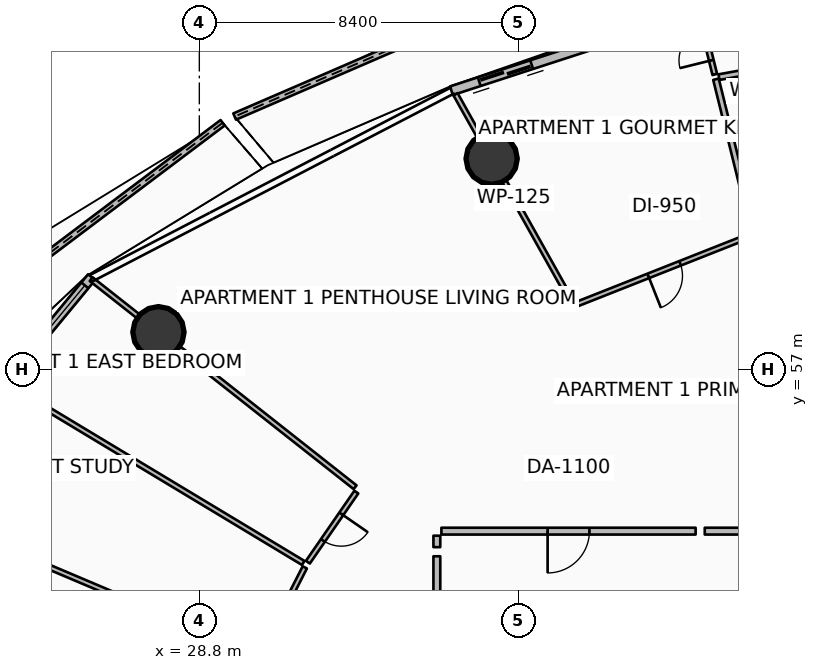
"""IFC4 building model, lengths in metres.
Left out: names, types, materials, properties, quantities, classifications, styles, units other than length and angle.
Written with IfcOpenShell. Run it as: python <this file> out.ifc"""

import sys

from ifc_helpers import new_model, si_unit, direction, frame, frame_2d, origin, origin_2d, place, context, subcontext, project, spatial, polyline, rectangle, circle, outline, extrude, element, fill, save


model = new_model("IFC4")
c1 = context("Model", 3, precision=1e-05, world=origin(), true_north=direction((0.0, 1.0)))
c2 = subcontext(c1, "Body", "Model", "MODEL_VIEW")
j1 = project(units=[si_unit("LENGTHUNIT", "METRE"), si_unit("PLANEANGLEUNIT", "RADIAN")], contexts=[c1])
p1 = place(None, origin())
s1 = spatial("IfcSite", under=j1, at=p1, CompositionType="ELEMENT")
p2 = place(p1, origin())
s2 = spatial("IfcBuilding", under=s1, at=p2, CompositionType="ELEMENT")
p3 = place(p2, frame((0.0, 0.0, 67.65)))
s3 = spatial("IfcBuildingStorey", under=s2, at=p3, CompositionType="ELEMENT", Elevation=67.65)
for number, where, z_axis, x_axis in (
    (1, (36.492, 62.55, 0.0), (0.0, 0.0, 1.0), (1.0, 0.0, 0.0)),
    (2, (27.724, 57.984, 0.0), (0.0, 0.0, 1.0), (1.0, 0.0, 0.0)),
):
    element("IfcColumn", number, at=place(p3, frame(where, z_axis=z_axis, x_axis=x_axis)), inside=s3, PredefinedType="COLUMN", context=c2, shape_type="SweptSolid", body=[
        extrude(circle(Radius=0.675, at=origin_2d()), origin(), (0.0, 0.0, 1.0), 3.35),
    ])
p4 = place(p3, frame((39.469, 67.87, 0.0), z_axis=(0.0, 0.0, 1.0), x_axis=(-0.91788240727, -0.396852474384, 0.0)))
e3 = element("IfcWall", 3, at=p4, inside=s3, PredefinedType="PARAPET", context=c2, shape_type="SweptSolid", body=[
    extrude(outline(polyline([(0.0, 0.0), (10.611, 0.0), (10.611, 1.12), (5.305, 1.182), (0.0, 1.348), (0.0, 0.0)])), frame((0.0, 0.09, 0.0), z_axis=(0.0, -1.0, 0.0), x_axis=(1.0, 0.0, 0.0)), (0.0, 0.0, 1.0), 0.18),
])
p5 = place(p3, frame((29.413, 63.495, 0.0), z_axis=(0.0, 0.0, 1.0), x_axis=(-0.798916487869, -0.601441971773, 0.0)))
e4 = element("IfcWall", 4, at=p5, inside=s3, PredefinedType="PARAPET", context=c2, shape_type="SweptSolid", body=[
    extrude(outline(polyline([(0.0, 0.0), (11.803, 0.0), (11.803, 1.348), (5.902, 1.182), (0.0, 1.12), (0.0, 0.0)])), frame((0.0, 0.09, 0.0), z_axis=(0.0, -1.0, 0.0), x_axis=(1.0, 0.0, 0.0)), (0.0, 0.0, 1.0), 0.18),
])
p6 = place(p3, frame((45.036, 67.458, 0.0), z_axis=(0.0, 0.0, 1.0), x_axis=(-0.951054679225, -0.309022648238, 0.0)))
e5 = element("IfcWall", 5, at=p6, inside=s3, PredefinedType="SOLIDWALL", context=c2, shape_type="SweptSolid", body=[
    extrude(rectangle(XDim=10.097, YDim=0.24, at=frame_2d((5.048, 0.0))), origin(), (0.0, 0.0, 1.0), 2.3),
])
p7 = place(p6, frame((7.877, 0.0, 0.0)))
e6 = element("IfcOpeningElement", 6, at=p7, cuts=e5, PredefinedType="OPENING", context=c2, shape_type="SweptSolid", body=[
    extrude(rectangle(XDim=1.45, YDim=2.15, at=frame_2d((0.725, 1.075))), frame((0.0, 0.13, 0.0), z_axis=(0.0, -1.0, 0.0), x_axis=(1.0, 0.0, 0.0)), (0.0, 0.0, 1.0), 0.26),
])
p8 = place(p6, frame((0.28, 0.0, 0.65)))
e7 = element("IfcOpeningElement", 7, at=p8, cuts=e5, PredefinedType="OPENING", context=c2, shape_type="SweptSolid", body=[
    extrude(rectangle(XDim=1.6, YDim=1.5, at=frame_2d((0.8, 0.75))), frame((0.0, 0.13, 0.0), z_axis=(0.0, -1.0, 0.0), x_axis=(1.0, 0.0, 0.0)), (0.0, 0.0, 1.0), 0.26),
])
p9 = place(p3, frame((25.967, 59.433, 0.0), z_axis=(0.0, 0.0, 1.0), x_axis=(-0.636674332663, -0.771132799281, 0.0)))
e8 = element("IfcWall", 8, at=p9, inside=s3, PredefinedType="SOLIDWALL", context=c2, shape_type="SweptSolid", body=[
    extrude(rectangle(XDim=11.851, YDim=0.24, at=frame_2d((5.926, 0.0))), origin(), (0.0, 0.0, 1.0), 2.3),
])
p10 = place(p9, frame((9.631, 0.0, 0.0)))
e9 = element("IfcOpeningElement", 9, at=p10, cuts=e8, PredefinedType="OPENING", context=c2, shape_type="SweptSolid", body=[
    extrude(rectangle(XDim=1.45, YDim=2.15, at=frame_2d((0.725, 1.075))), frame((0.0, 0.13, 0.0), z_axis=(0.0, -1.0, 0.0), x_axis=(1.0, 0.0, 0.0)), (0.0, 0.0, 1.0), 0.26),
])
p11 = place(p9, frame((0.28, 0.0, 0.65)))
e10 = element("IfcOpeningElement", 10, at=p11, cuts=e8, PredefinedType="OPENING", context=c2, shape_type="SweptSolid", body=[
    extrude(rectangle(XDim=1.6, YDim=1.5, at=frame_2d((0.8, 0.75))), frame((0.0, 0.13, 0.0), z_axis=(0.0, -1.0, 0.0), x_axis=(1.0, 0.0, 0.0)), (0.0, 0.0, 1.0), 0.26),
])
p12 = place(p3, frame((41.86, 52.75, 0.0), z_axis=(0.0, 0.0, 1.0), x_axis=(-1.0, 0.0, 0.0)))
e11 = element("IfcWall", 11, at=p12, inside=s3, PredefinedType="PARTITIONING", context=c2, shape_type="SweptSolid", body=[
    extrude(rectangle(XDim=6.69, YDim=0.18, at=frame_2d((3.345, 0.0))), origin(), (0.0, 0.0, 1.0), 2.717),
])
p13 = place(p12, frame((2.795, 0.0, 0.0)))
e12 = element("IfcOpeningElement", 12, at=p13, cuts=e11, PredefinedType="OPENING", context=c2, shape_type="SweptSolid", body=[
    extrude(rectangle(XDim=1.1, YDim=2.1, at=frame_2d((0.55, 1.05))), frame((0.0, 0.1, 0.0), z_axis=(0.0, -1.0, 0.0), x_axis=(1.0, 0.0, 0.0)), (0.0, 0.0, 1.0), 0.2),
])
p14 = place(p3, frame((35.05, 52.63, 0.0), z_axis=(0.0, 0.0, 1.0), x_axis=(0.0, -1.0, 0.0)))
e13 = element("IfcWall", 13, at=p14, inside=s3, PredefinedType="PARTITIONING", context=c2, shape_type="SweptSolid", body=[
    extrude(rectangle(XDim=0.301, YDim=0.18, at=frame_2d((0.15, 0.0))), origin(), (0.0, 0.0, 1.0), 2.717),
])
p15 = place(p3, frame((46.608, 52.75, 0.0), z_axis=(0.0, 0.0, 1.0), x_axis=(-1.0, 0.0, 0.0)))
e14 = element("IfcWall", 14, at=p15, inside=s3, PredefinedType="PARTITIONING", context=c2, shape_type="SweptSolid", body=[
    extrude(rectangle(XDim=4.508, YDim=0.18, at=frame_2d((2.254, 0.0))), origin(), (0.0, 0.0, 1.0), 2.717),
])
p16 = place(p3, frame((38.604, 58.778, 0.0), z_axis=(0.0, 0.0, 1.0), x_axis=(-0.488617606889, 0.872498042541, 0.0)))
e15 = element("IfcWall", 15, at=p16, inside=s3, PredefinedType="PARTITIONING", context=c2, shape_type="SweptSolid", body=[
    extrude(rectangle(XDim=6.266, YDim=0.125, at=frame_2d((3.133, 0.0))), origin(), (0.0, 0.0, 1.0), 2.717),
])
p17 = place(p3, frame((45.156, 65.184, 0.0), z_axis=(0.0, 0.0, 1.0), x_axis=(-0.983792433056, -0.179311038873, 0.0)))
e16 = element("IfcWall", 16, at=p17, inside=s3, PredefinedType="PARTITIONING", context=c2, shape_type="SweptSolid", body=[
    extrude(rectangle(XDim=2.726, YDim=0.15, at=frame_2d((1.363, 0.0))), origin(), (0.0, 0.0, 1.0), 2.717),
])
p18 = place(p3, frame((43.381, 60.657, 0.0), z_axis=(0.0, 0.0, 1.0), x_axis=(-0.240281337946, 0.97070329073, 0.0)))
e17 = element("IfcWall", 17, at=p18, inside=s3, PredefinedType="PARTITIONING", context=c2, shape_type="SweptSolid", body=[
    extrude(rectangle(XDim=4.104, YDim=0.15, at=frame_2d((2.052, 0.0))), origin(), (0.0, 0.0, 1.0), 2.79),
])
p19 = place(p3, frame((42.364, 64.767, 0.0), z_axis=(0.0, 0.0, 1.0), x_axis=(-0.240399183991, 0.970674112324, 0.0)))
e18 = element("IfcWall", 18, at=p19, inside=s3, PredefinedType="PARTITIONING", context=c2, shape_type="SweptSolid", body=[
    extrude(rectangle(XDim=1.614, YDim=0.125, at=frame_2d((0.807, 0.0))), origin(), (0.0, 0.0, 1.0), 2.79),
])
p20 = place(p19, frame((0.382, 0.0, 0.0)))
e19 = element("IfcOpeningElement", 19, at=p20, cuts=e18, PredefinedType="OPENING", context=c2, shape_type="SweptSolid", body=[
    extrude(rectangle(XDim=0.85, YDim=2.06, at=frame_2d((0.425, 1.03))), frame((0.0, 0.073, 0.0), z_axis=(0.0, -1.0, 0.0), x_axis=(1.0, 0.0, 0.0)), (0.0, 0.0, 1.0), 0.145),
])
p21 = place(p3, frame((43.319, 60.536, 0.0), z_axis=(0.0, 0.0, 1.0), x_axis=(-0.929910978534, -0.367784681576, 0.0)))
e20 = element("IfcWall", 20, at=p21, inside=s3, PredefinedType="PARTITIONING", context=c2, shape_type="SweptSolid", body=[
    extrude(rectangle(XDim=4.918, YDim=0.125, at=frame_2d((2.459, 0.0))), origin(), (0.0, 0.0, 1.0), 2.717),
])
p22 = place(p21, frame((2.009, 0.0, 0.0)))
e21 = element("IfcOpeningElement", 21, at=p22, cuts=e20, PredefinedType="OPENING", context=c2, shape_type="SweptSolid", body=[
    extrude(rectangle(XDim=0.9, YDim=2.08, at=frame_2d((0.45, 1.04))), frame((0.0, 0.073, 0.0), z_axis=(0.0, -1.0, 0.0), x_axis=(1.0, 0.0, 0.0)), (0.0, 0.0, 1.0), 0.145),
])
p23 = place(p3, frame((35.05, 52.089, 0.0), z_axis=(0.0, 0.0, 1.0), x_axis=(0.0, -1.0, 0.0)))
e22 = element("IfcWall", 22, at=p23, inside=s3, PredefinedType="PARTITIONING", context=c2, shape_type="SweptSolid", body=[
    extrude(rectangle(XDim=6.317, YDim=0.18, at=frame_2d((3.158, 0.0))), origin(), (0.0, 0.0, 1.0), 2.717),
])
p24 = place(p3, frame((32.898, 53.905, 0.0), z_axis=(0.0, 0.0, 1.0), x_axis=(-0.78532854108, 0.619079221558, 0.0)))
e23 = element("IfcWall", 23, at=p24, inside=s3, PredefinedType="PARTITIONING", context=c2, shape_type="SweptSolid", body=[
    extrude(rectangle(XDim=8.842, YDim=0.125, at=frame_2d((4.421, 0.0))), origin(), (0.0, 0.0, 1.0), 2.717),
])
p25 = place(p3, frame((31.534, 51.913, 0.0), z_axis=(0.0, 0.0, 1.0), x_axis=(-0.856706990958, 0.515803384676, 0.0)))
e24 = element("IfcWall", 24, at=p25, inside=s3, PredefinedType="PARTITIONING", context=c2, shape_type="SweptSolid", body=[
    extrude(rectangle(XDim=9.057, YDim=0.125, at=frame_2d((4.528, 0.0))), origin(), (0.0, 0.0, 1.0), 2.79),
])
p26 = place(p3, frame((30.301, 49.494, 0.0), z_axis=(0.0, 0.0, 1.0), x_axis=(-0.920840746031, 0.389938867579, 0.0)))
e25 = element("IfcWall", 25, at=p26, inside=s3, PredefinedType="PARTITIONING", context=c2, shape_type="SweptSolid", body=[
    extrude(rectangle(XDim=9.966, YDim=0.125, at=frame_2d((4.983, 0.0))), origin(), (0.0, 0.0, 1.0), 2.79),
])
p27 = place(p3, frame((32.931, 53.778, 0.0), z_axis=(0.0, 0.0, 1.0), x_axis=(-0.568541738061, -0.822654418382, 0.0)))
e26 = element("IfcWall", 26, at=p27, inside=s3, PredefinedType="PARTITIONING", context=c2, shape_type="SweptSolid", body=[
    extrude(rectangle(XDim=2.242, YDim=0.125, at=frame_2d((1.121, 0.0))), origin(), (0.0, 0.0, 1.0), 2.717),
])
p28 = place(p27, frame((0.696, 0.0, 0.0)))
e27 = element("IfcOpeningElement", 27, at=p28, cuts=e26, PredefinedType="OPENING", context=c2, shape_type="SweptSolid", body=[
    extrude(rectangle(XDim=0.85, YDim=2.06, at=frame_2d((0.425, 1.03))), frame((0.0, 0.073, 0.0), z_axis=(0.0, -1.0, 0.0), x_axis=(1.0, 0.0, 0.0)), (0.0, 0.0, 1.0), 0.145),
])
p29 = place(p3, frame((31.575, 51.796, 0.0), z_axis=(0.0, 0.0, 1.0), x_axis=(-0.454037986735, -0.890982326762, 0.0)))
e28 = element("IfcWall", 28, at=p29, inside=s3, PredefinedType="PARTITIONING", context=c2, shape_type="SweptSolid", body=[
    extrude(rectangle(XDim=2.542, YDim=0.125, at=frame_2d((1.271, 0.0))), origin(), (0.0, 0.0, 1.0), 2.79),
])
p30 = place(p29, frame((0.846, 0.0, 0.0)))
e29 = element("IfcOpeningElement", 29, at=p30, cuts=e28, PredefinedType="OPENING", context=c2, shape_type="SweptSolid", body=[
    extrude(rectangle(XDim=0.85, YDim=2.06, at=frame_2d((0.425, 1.03))), frame((0.0, 0.073, 0.0), z_axis=(0.0, -1.0, 0.0), x_axis=(1.0, 0.0, 0.0)), (0.0, 0.0, 1.0), 0.145),
])
p31 = place(p7, origin())
e30 = element("IfcDoor", 30, at=p31, inside=s3, OperationType="DOUBLE_DOOR_SLIDING", PredefinedType="DOOR", context=c2, shape_type="SweptSolid", body=[
    extrude(rectangle(XDim=1.45, YDim=2.15, at=frame_2d((0.725, 1.075))), frame((0.0, 0.025, 0.0), z_axis=(0.0, -1.0, 0.0), x_axis=(1.0, 0.0, 0.0)), (0.0, 0.0, 1.0), 0.05),
])
fill(e6, e30)
p32 = place(p11, origin())
e31 = element("IfcWindow", 31, at=p32, inside=s3, PartitioningType="SINGLE_PANEL", PredefinedType="WINDOW", context=c2, shape_type="SweptSolid", body=[
    extrude(rectangle(XDim=1.6, YDim=1.5, at=frame_2d((0.8, 0.75))), frame((0.0, 0.03, 0.0), z_axis=(0.0, -1.0, 0.0), x_axis=(1.0, 0.0, 0.0)), (0.0, 0.0, 1.0), 0.06),
])
fill(e10, e31)
p33 = place(p13, origin())
e32 = element("IfcDoor", 32, at=p33, inside=s3, OperationType="SINGLE_SWING_RIGHT", PredefinedType="DOOR", context=c2, shape_type="SweptSolid", body=[
    extrude(rectangle(XDim=1.1, YDim=2.1, at=frame_2d((0.55, 1.05))), frame((0.0, 0.025, 0.0), z_axis=(0.0, -1.0, 0.0), x_axis=(1.0, 0.0, 0.0)), (0.0, 0.0, 1.0), 0.05),
])
fill(e12, e32)
p34 = place(p20, origin())
e33 = element("IfcDoor", 33, at=p34, inside=s3, OperationType="SINGLE_SWING_LEFT", PredefinedType="DOOR", context=c2, shape_type="SweptSolid", body=[
    extrude(rectangle(XDim=0.85, YDim=2.06, at=frame_2d((0.425, 1.03))), frame((0.0, 0.025, 0.0), z_axis=(0.0, -1.0, 0.0), x_axis=(1.0, 0.0, 0.0)), (0.0, 0.0, 1.0), 0.05),
])
fill(e19, e33)
p35 = place(p22, origin())
e34 = element("IfcDoor", 34, at=p35, inside=s3, OperationType="SINGLE_SWING_RIGHT", PredefinedType="DOOR", context=c2, shape_type="SweptSolid", body=[
    extrude(rectangle(XDim=0.9, YDim=2.08, at=frame_2d((0.45, 1.04))), frame((0.0, 0.025, 0.0), z_axis=(0.0, -1.0, 0.0), x_axis=(1.0, 0.0, 0.0)), (0.0, 0.0, 1.0), 0.05),
])
fill(e21, e34)
p36 = place(p28, origin())
e35 = element("IfcDoor", 35, at=p36, inside=s3, OperationType="SINGLE_SWING_LEFT", PredefinedType="DOOR", context=c2, shape_type="SweptSolid", body=[
    extrude(rectangle(XDim=0.85, YDim=2.06, at=frame_2d((0.425, 1.03))), frame((0.0, 0.025, 0.0), z_axis=(0.0, -1.0, 0.0), x_axis=(1.0, 0.0, 0.0)), (0.0, 0.0, 1.0), 0.05),
])
fill(e27, e35)
save(model, sys.argv[1])
